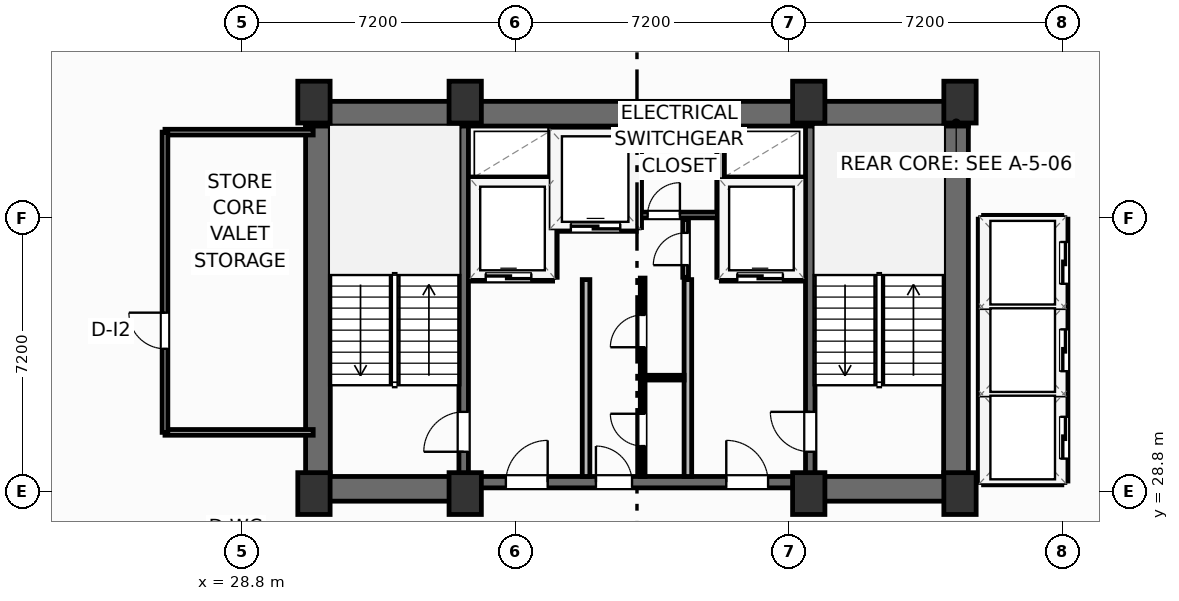
"""IFC4 building model, lengths in metres.
Left out: names, types, materials, properties, quantities, classifications, styles, units other than length and angle.
Written with IfcOpenShell. Run it as: python <this file> out.ifc"""

import sys

from ifc_helpers import new_model, si_unit, direction, frame, frame_2d, origin, origin_2d, place, context, subcontext, project, spatial, rectangle, extrude, element, fill, save


model = new_model("IFC4")
c1 = context("Model", 3, precision=1e-05, world=origin(), true_north=direction((0.0, 1.0)))
c2 = subcontext(c1, "Body", "Model", "MODEL_VIEW")
j1 = project(units=[si_unit("LENGTHUNIT", "METRE"), si_unit("PLANEANGLEUNIT", "RADIAN")], contexts=[c1])
p1 = place(None, origin())
s1 = spatial("IfcSite", under=j1, at=p1, CompositionType="ELEMENT")
p2 = place(p1, origin())
s2 = spatial("IfcBuilding", under=s1, at=p2, CompositionType="ELEMENT")
p3 = place(p2, frame((0.0, 0.0, 182.0)))
s3 = spatial("IfcBuildingStorey", under=s2, at=p3, CompositionType="ELEMENT", Elevation=182.0)
for number, where, z_axis, x_axis in (
    (1, (30.7, 28.75, 0.0), (0.0, 0.0, 1.0), (1.0, 0.0, 0.0)),
    (2, (34.68, 28.75, 0.0), (0.0, 0.0, 1.0), (1.0, 0.0, 0.0)),
    (3, (43.72, 28.75, 0.0), (0.0, 0.0, 1.0), (1.0, 0.0, 0.0)),
    (4, (47.7, 28.75, 0.0), (0.0, 0.0, 1.0), (1.0, 0.0, 0.0)),
    (5, (30.7, 39.05, 0.0), (0.0, 0.0, 1.0), (1.0, 0.0, 0.0)),
    (6, (34.68, 39.05, 0.0), (0.0, 0.0, 1.0), (1.0, 0.0, 0.0)),
    (7, (43.72, 39.05, 0.0), (0.0, 0.0, 1.0), (1.0, 0.0, 0.0)),
    (8, (47.7, 39.05, 0.0), (0.0, 0.0, 1.0), (1.0, 0.0, 0.0)),
):
    element("IfcColumn", number, at=place(p3, frame(where, z_axis=z_axis, x_axis=x_axis)), inside=s3, PredefinedType="COLUMN", context=c2, shape_type="SweptSolid", body=[
        extrude(rectangle(XDim=0.85, YDim=1.1, at=origin_2d()), origin(), (0.0, 0.0, 1.0), 3.7),
    ])
p4 = place(p3, frame((30.48, 38.745, 0.0), z_axis=(0.0, 0.0, 1.0), x_axis=(1.0, 0.0, 0.0)))
e9 = element("IfcWall", 9, at=p4, inside=s3, PredefinedType="SHEAR", context=c2, shape_type="SweptSolid", body=[
    extrude(rectangle(XDim=17.44, YDim=0.65, at=frame_2d((8.72, 0.0))), origin(), (0.0, 0.0, 1.0), 3.45),
])
for number, where, z_axis, x_axis in (
    (10, (30.805, 29.2, 0.0), (0.0, 0.0, 1.0), (0.0, 1.0, 0.0)),
    (11, (47.595, 29.2, 0.0), (0.0, 0.0, 1.0), (0.0, 1.0, 0.0)),
):
    element("IfcWall", number, at=place(p3, frame(where, z_axis=z_axis, x_axis=x_axis)), inside=s3, PredefinedType="SHEAR", context=c2, shape_type="SweptSolid", body=[
        extrude(rectangle(XDim=9.22, YDim=0.65, at=frame_2d((4.61, 0.0))), origin(), (0.0, 0.0, 1.0), 3.45),
    ])
p5 = place(p3, frame((30.48, 28.875, 0.0), z_axis=(0.0, 0.0, 1.0), x_axis=(1.0, 0.0, 0.0)))
e12 = element("IfcWall", 12, at=p5, inside=s3, PredefinedType="SHEAR", context=c2, shape_type="SweptSolid", body=[
    extrude(rectangle(XDim=4.32, YDim=0.65, at=frame_2d((2.16, 0.0))), origin(), (0.0, 0.0, 1.0), 3.45),
])
p6 = place(p3, frame((43.6, 28.875, 0.0), z_axis=(0.0, 0.0, 1.0), x_axis=(1.0, 0.0, 0.0)))
e13 = element("IfcWall", 13, at=p6, inside=s3, PredefinedType="SHEAR", context=c2, shape_type="SweptSolid", body=[
    extrude(rectangle(XDim=4.32, YDim=0.65, at=frame_2d((2.16, 0.0))), origin(), (0.0, 0.0, 1.0), 3.45),
])
p7 = place(p3, frame((34.8, 29.05, 0.0), z_axis=(0.0, 0.0, 1.0), x_axis=(1.0, 0.0, 0.0)))
e14 = element("IfcWall", 14, at=p7, inside=s3, PredefinedType="SHEAR", context=c2, shape_type="SweptSolid", body=[
    extrude(rectangle(XDim=8.8, YDim=0.3, at=frame_2d((4.4, 0.0))), origin(), (0.0, 0.0, 1.0), 3.45),
])
p8 = place(p7, frame((0.95, 0.0, 0.0)))
e15 = element("IfcOpeningElement", 15, at=p8, cuts=e14, PredefinedType="OPENING", context=c2, shape_type="SweptSolid", body=[
    extrude(rectangle(XDim=1.1, YDim=2.15, at=frame_2d((0.55, 1.075))), frame((0.0, 0.16, 0.0), z_axis=(0.0, -1.0, 0.0), x_axis=(1.0, 0.0, 0.0)), (0.0, 0.0, 1.0), 0.32),
])
p9 = place(p7, frame((6.75, 0.0, 0.0)))
e16 = element("IfcOpeningElement", 16, at=p9, cuts=e14, PredefinedType="OPENING", context=c2, shape_type="SweptSolid", body=[
    extrude(rectangle(XDim=1.1, YDim=2.15, at=frame_2d((0.55, 1.075))), frame((0.0, 0.16, 0.0), z_axis=(0.0, -1.0, 0.0), x_axis=(1.0, 0.0, 0.0)), (0.0, 0.0, 1.0), 0.32),
])
p10 = place(p7, frame((3.32, 0.0, 0.0)))
e17 = element("IfcOpeningElement", 17, at=p10, cuts=e14, PredefinedType="OPENING", context=c2, shape_type="SweptSolid", body=[
    extrude(rectangle(XDim=0.95, YDim=2.15, at=frame_2d((0.475, 1.075))), frame((0.0, 0.16, 0.0), z_axis=(0.0, -1.0, 0.0), x_axis=(1.0, 0.0, 0.0)), (0.0, 0.0, 1.0), 0.32),
])
p11 = place(p3, frame((34.64, 29.2, 0.0), z_axis=(0.0, 0.0, 1.0), x_axis=(0.0, 1.0, 0.0)))
e18 = element("IfcWall", 18, at=p11, inside=s3, PredefinedType="SHEAR", context=c2, shape_type="SweptSolid", body=[
    extrude(rectangle(XDim=9.22, YDim=0.25, at=frame_2d((4.61, 0.0))), origin(), (0.0, 0.0, 1.0), 3.45),
])
p12 = place(p11, frame((0.65, 0.0, 0.0)))
e19 = element("IfcOpeningElement", 19, at=p12, cuts=e18, PredefinedType="OPENING", context=c2, shape_type="SweptSolid", body=[
    extrude(rectangle(XDim=1.05, YDim=2.15, at=frame_2d((0.525, 1.075))), frame((0.0, 0.135, 0.0), z_axis=(0.0, -1.0, 0.0), x_axis=(1.0, 0.0, 0.0)), (0.0, 0.0, 1.0), 0.27),
])
p13 = place(p3, frame((43.76, 29.2, 0.0), z_axis=(0.0, 0.0, 1.0), x_axis=(0.0, 1.0, 0.0)))
e20 = element("IfcWall", 20, at=p13, inside=s3, PredefinedType="SHEAR", context=c2, shape_type="SweptSolid", body=[
    extrude(rectangle(XDim=9.22, YDim=0.25, at=frame_2d((4.61, 0.0))), origin(), (0.0, 0.0, 1.0), 3.45),
])
p14 = place(p13, frame((0.65, 0.0, 0.0)))
e21 = element("IfcOpeningElement", 21, at=p14, cuts=e20, PredefinedType="OPENING", context=c2, shape_type="SweptSolid", body=[
    extrude(rectangle(XDim=1.05, YDim=2.15, at=frame_2d((0.525, 1.075))), frame((0.0, 0.135, 0.0), z_axis=(0.0, -1.0, 0.0), x_axis=(1.0, 0.0, 0.0)), (0.0, 0.0, 1.0), 0.27),
])
for number, where, z_axis, x_axis in (
    (22, (37.86, 29.2, 0.0), (0.0, 0.0, 1.0), (0.0, 1.0, 0.0)),
    (23, (40.54, 29.2, 0.0), (0.0, 0.0, 1.0), (0.0, 1.0, 0.0)),
):
    element("IfcWall", number, at=place(p3, frame(where, z_axis=z_axis, x_axis=x_axis)), inside=s3, PredefinedType="PARTITIONING", context=c2, shape_type="SweptSolid", body=[
        extrude(rectangle(XDim=5.18, YDim=0.2, at=frame_2d((2.59, 0.0))), origin(), (0.0, 0.0, 1.0), 3.45),
    ])
p15 = place(p3, frame((34.8, 34.44, 0.0), z_axis=(0.0, 0.0, 1.0), x_axis=(1.0, 0.0, 0.0)))
e24 = element("IfcWall", 24, at=p15, inside=s3, PredefinedType="PARTITIONING", context=c2, shape_type="SweptSolid", body=[
    extrude(rectangle(XDim=2.18, YDim=0.2, at=frame_2d((1.09, 0.0))), origin(), (0.0, 0.0, 1.0), 3.45),
])
p16 = place(p15, frame((0.42, 0.0, 0.0)))
e25 = element("IfcOpeningElement", 25, at=p16, cuts=e24, PredefinedType="OPENING", context=c2, shape_type="SweptSolid", body=[
    extrude(rectangle(XDim=1.2, YDim=2.2, at=frame_2d((0.6, 1.1))), frame((0.0, 0.11, 0.0), z_axis=(0.0, -1.0, 0.0), x_axis=(1.0, 0.0, 0.0)), (0.0, 0.0, 1.0), 0.22),
])
p17 = place(p3, frame((34.8, 36.98, 0.0), z_axis=(0.0, 0.0, 1.0), x_axis=(1.0, 0.0, 0.0)))
e26 = element("IfcWall", 26, at=p17, inside=s3, PredefinedType="PARTITIONING", context=c2, shape_type="SweptSolid", body=[
    extrude(rectangle(XDim=2.18, YDim=0.2, at=frame_2d((1.09, 0.0))), origin(), (0.0, 0.0, 1.0), 3.45),
])
p18 = place(p3, frame((37.0, 34.44, 0.0), z_axis=(0.0, 0.0, 1.0), x_axis=(0.0, 1.0, 0.0)))
e27 = element("IfcWall", 27, at=p18, inside=s3, PredefinedType="PARTITIONING", context=c2, shape_type="SweptSolid", body=[
    extrude(rectangle(XDim=3.9, YDim=0.2, at=frame_2d((1.95, 0.0))), origin(), (0.0, 0.0, 1.0), 3.45),
])
p19 = place(p3, frame((41.42, 34.44, 0.0), z_axis=(0.0, 0.0, 1.0), x_axis=(1.0, 0.0, 0.0)))
e28 = element("IfcWall", 28, at=p19, inside=s3, PredefinedType="PARTITIONING", context=c2, shape_type="SweptSolid", body=[
    extrude(rectangle(XDim=2.18, YDim=0.2, at=frame_2d((1.09, 0.0))), origin(), (0.0, 0.0, 1.0), 3.45),
])
p20 = place(p19, frame((0.42, 0.0, 0.0)))
e29 = element("IfcOpeningElement", 29, at=p20, cuts=e28, PredefinedType="OPENING", context=c2, shape_type="SweptSolid", body=[
    extrude(rectangle(XDim=1.2, YDim=2.2, at=frame_2d((0.6, 1.1))), frame((0.0, 0.11, 0.0), z_axis=(0.0, -1.0, 0.0), x_axis=(1.0, 0.0, 0.0)), (0.0, 0.0, 1.0), 0.22),
])
p21 = place(p3, frame((41.42, 36.98, 0.0), z_axis=(0.0, 0.0, 1.0), x_axis=(1.0, 0.0, 0.0)))
e30 = element("IfcWall", 30, at=p21, inside=s3, PredefinedType="PARTITIONING", context=c2, shape_type="SweptSolid", body=[
    extrude(rectangle(XDim=2.18, YDim=0.2, at=frame_2d((1.09, 0.0))), origin(), (0.0, 0.0, 1.0), 3.45),
])
p22 = place(p3, frame((41.4, 34.44, 0.0), z_axis=(0.0, 0.0, 1.0), x_axis=(0.0, 1.0, 0.0)))
e31 = element("IfcWall", 31, at=p22, inside=s3, PredefinedType="PARTITIONING", context=c2, shape_type="SweptSolid", body=[
    extrude(rectangle(XDim=3.9, YDim=0.2, at=frame_2d((1.95, 0.0))), origin(), (0.0, 0.0, 1.0), 3.45),
])
p23 = place(p3, frame((37.06, 35.75, 0.0), z_axis=(0.0, 0.0, 1.0), x_axis=(1.0, 0.0, 0.0)))
e32 = element("IfcWall", 32, at=p23, inside=s3, PredefinedType="PARTITIONING", context=c2, shape_type="SweptSolid", body=[
    extrude(rectangle(XDim=2.12, YDim=0.2, at=frame_2d((1.06, 0.0))), origin(), (0.0, 0.0, 1.0), 3.45),
])
p24 = place(p23, frame((0.4, 0.0, 0.0)))
e33 = element("IfcOpeningElement", 33, at=p24, cuts=e32, PredefinedType="OPENING", context=c2, shape_type="SweptSolid", body=[
    extrude(rectangle(XDim=1.3, YDim=2.2, at=frame_2d((0.65, 1.1))), frame((0.0, 0.11, 0.0), z_axis=(0.0, -1.0, 0.0), x_axis=(1.0, 0.0, 0.0)), (0.0, 0.0, 1.0), 0.22),
])
p25 = place(p3, frame((39.22, 35.75, 0.0), z_axis=(0.0, 0.0, 1.0), x_axis=(0.0, 1.0, 0.0)))
e34 = element("IfcWall", 34, at=p25, inside=s3, PredefinedType="PARTITIONING", context=c2, shape_type="SweptSolid", body=[
    extrude(rectangle(XDim=2.59, YDim=0.2, at=frame_2d((1.295, 0.0))), origin(), (0.0, 0.0, 1.0), 3.45),
])
p26 = place(p3, frame((39.3, 36.08, 0.0), z_axis=(0.0, 0.0, 1.0), x_axis=(1.0, 0.0, 0.0)))
e35 = element("IfcWall", 35, at=p26, inside=s3, PredefinedType="PARTITIONING", context=c2, shape_type="SweptSolid", body=[
    extrude(rectangle(XDim=2.02, YDim=0.15, at=frame_2d((1.01, 0.0))), origin(), (0.0, 0.0, 1.0), 3.45),
])
p27 = place(p26, frame((0.18, 0.0, 0.0)))
e36 = element("IfcOpeningElement", 36, at=p27, cuts=e35, PredefinedType="OPENING", context=c2, shape_type="SweptSolid", body=[
    extrude(rectangle(XDim=0.85, YDim=2.05, at=frame_2d((0.425, 1.025))), frame((0.0, 0.085, 0.0), z_axis=(0.0, -1.0, 0.0), x_axis=(1.0, 0.0, 0.0)), (0.0, 0.0, 1.0), 0.17),
])
p28 = place(p3, frame((40.48, 34.44, 0.0), z_axis=(0.0, 0.0, 1.0), x_axis=(0.0, 1.0, 0.0)))
e37 = element("IfcWall", 37, at=p28, inside=s3, PredefinedType="PARTITIONING", context=c2, shape_type="SweptSolid", body=[
    extrude(rectangle(XDim=1.52, YDim=0.15, at=frame_2d((0.76, 0.0))), origin(), (0.0, 0.0, 1.0), 3.45),
])
p29 = place(p28, frame((0.32, 0.0, 0.0)))
e38 = element("IfcOpeningElement", 38, at=p29, cuts=e37, PredefinedType="OPENING", context=c2, shape_type="SweptSolid", body=[
    extrude(rectangle(XDim=0.85, YDim=2.05, at=frame_2d((0.425, 1.025))), frame((0.0, 0.085, 0.0), z_axis=(0.0, -1.0, 0.0), x_axis=(1.0, 0.0, 0.0)), (0.0, 0.0, 1.0), 0.17),
])
p30 = place(p3, frame((39.35, 31.8, 0.0), z_axis=(0.0, 0.0, 1.0), x_axis=(1.0, 0.0, 0.0)))
e39 = element("IfcWall", 39, at=p30, inside=s3, PredefinedType="PARTITIONING", context=c2, shape_type="SweptSolid", body=[
    extrude(rectangle(XDim=1.09, YDim=0.125, at=frame_2d((0.545, 0.0))), origin(), (0.0, 0.0, 1.0), 3.45),
])
p31 = place(p3, frame((39.35, 29.2, 0.0), z_axis=(0.0, 0.0, 1.0), x_axis=(0.0, 1.0, 0.0)))
e40 = element("IfcWall", 40, at=p31, inside=s3, PredefinedType="PARTITIONING", context=c2, shape_type="SweptSolid", body=[
    extrude(rectangle(XDim=5.22, YDim=0.125, at=frame_2d((2.61, 0.0))), origin(), (0.0, 0.0, 1.0), 3.45),
])
p32 = place(p31, frame((0.8, 0.0, 0.0)))
e41 = element("IfcOpeningElement", 41, at=p32, cuts=e40, PredefinedType="OPENING", context=c2, shape_type="SweptSolid", body=[
    extrude(rectangle(XDim=0.85, YDim=2.05, at=frame_2d((0.425, 1.025))), frame((0.0, 0.073, 0.0), z_axis=(0.0, -1.0, 0.0), x_axis=(1.0, 0.0, 0.0)), (0.0, 0.0, 1.0), 0.145),
])
p33 = place(p31, frame((3.4, 0.0, 0.0)))
e42 = element("IfcOpeningElement", 42, at=p33, cuts=e40, PredefinedType="OPENING", context=c2, shape_type="SweptSolid", body=[
    extrude(rectangle(XDim=0.85, YDim=2.05, at=frame_2d((0.425, 1.025))), frame((0.0, 0.073, 0.0), z_axis=(0.0, -1.0, 0.0), x_axis=(1.0, 0.0, 0.0)), (0.0, 0.0, 1.0), 0.145),
])
for number, where, z_axis, x_axis in (
    (43, (26.78, 30.36, 0.0), (0.0, 0.0, 1.0), (1.0, 0.0, 0.0)),
    (44, (26.78, 38.26, 0.0), (0.0, 0.0, 1.0), (1.0, 0.0, 0.0)),
):
    element("IfcWall", number, at=place(p3, frame(where, z_axis=z_axis, x_axis=x_axis)), inside=s3, PredefinedType="PARTITIONING", context=c2, shape_type="SweptSolid", body=[
        extrude(rectangle(XDim=3.9, YDim=0.15, at=frame_2d((1.95, 0.0))), origin(), (0.0, 0.0, 1.0), 3.45),
    ])
p34 = place(p3, frame((26.78, 30.36, 0.0), z_axis=(0.0, 0.0, 1.0), x_axis=(0.0, 1.0, 0.0)))
e45 = element("IfcWall", 45, at=p34, inside=s3, PredefinedType="PARTITIONING", context=c2, shape_type="SweptSolid", body=[
    extrude(rectangle(XDim=7.9, YDim=0.15, at=frame_2d((3.95, 0.0))), origin(), (0.0, 0.0, 1.0), 3.45),
])
p35 = place(p34, frame((2.2, 0.0, 0.0)))
e46 = element("IfcOpeningElement", 46, at=p35, cuts=e45, PredefinedType="OPENING", context=c2, shape_type="SweptSolid", body=[
    extrude(rectangle(XDim=0.95, YDim=2.05, at=frame_2d((0.475, 1.025))), frame((0.0, 0.085, 0.0), z_axis=(0.0, -1.0, 0.0), x_axis=(1.0, 0.0, 0.0)), (0.0, 0.0, 1.0), 0.17),
])
for number, where, z_axis, x_axis in (
    (47, (48.32, 31.375, 0.0), (0.0, 0.0, 1.0), (1.0, 0.0, 0.0)),
    (48, (48.32, 33.675, 0.0), (0.0, 0.0, 1.0), (1.0, 0.0, 0.0)),
):
    element("IfcWall", number, at=place(p3, frame(where, z_axis=z_axis, x_axis=x_axis)), inside=s3, PredefinedType="PARTITIONING", context=c2, shape_type="SweptSolid", body=[
        extrude(rectangle(XDim=2.06, YDim=0.2, at=frame_2d((1.03, 0.0))), origin(), (0.0, 0.0, 1.0), 3.45),
    ])
p36 = place(p3, frame((48.32, 29.08, 0.0), z_axis=(0.0, 0.0, 1.0), x_axis=(1.0, 0.0, 0.0)))
e49 = element("IfcWall", 49, at=p36, inside=s3, PredefinedType="PARTITIONING", context=c2, shape_type="SweptSolid", body=[
    extrude(rectangle(XDim=2.06, YDim=0.2, at=frame_2d((1.03, 0.0))), origin(), (0.0, 0.0, 1.0), 2.662),
])
p37 = place(p3, frame((48.32, 35.97, 0.0), z_axis=(0.0, 0.0, 1.0), x_axis=(1.0, 0.0, 0.0)))
e50 = element("IfcWall", 50, at=p37, inside=s3, PredefinedType="PARTITIONING", context=c2, shape_type="SweptSolid", body=[
    extrude(rectangle(XDim=2.06, YDim=0.2, at=frame_2d((1.03, 0.0))), origin(), (0.0, 0.0, 1.0), 3.45),
])
p38 = place(p3, frame((48.28, 29.08, 0.0), z_axis=(0.0, 0.0, 1.0), x_axis=(0.0, 1.0, 0.0)))
e51 = element("IfcWall", 51, at=p38, inside=s3, PredefinedType="PARTITIONING", context=c2, shape_type="SweptSolid", body=[
    extrude(rectangle(XDim=6.89, YDim=0.2, at=frame_2d((3.445, 0.0))), origin(), (0.0, 0.0, 1.0), 3.45),
])
p39 = place(p3, frame((50.44, 29.08, 0.0), z_axis=(0.0, 0.0, 1.0), x_axis=(0.0, 1.0, 0.0)))
e52 = element("IfcWall", 52, at=p39, inside=s3, PredefinedType="PARTITIONING", context=c2, shape_type="SweptSolid", body=[
    extrude(rectangle(XDim=6.89, YDim=0.2, at=frame_2d((3.445, 0.0))), origin(), (0.0, 0.0, 1.0), 3.45),
])
p40 = place(p39, frame((0.59, 0.0, 0.0)))
e53 = element("IfcOpeningElement", 53, at=p40, cuts=e52, PredefinedType="OPENING", context=c2, shape_type="SweptSolid", body=[
    extrude(rectangle(XDim=1.1, YDim=2.15, at=frame_2d((0.55, 1.075))), frame((0.0, 0.11, 0.0), z_axis=(0.0, -1.0, 0.0), x_axis=(1.0, 0.0, 0.0)), (0.0, 0.0, 1.0), 0.22),
])
p41 = place(p39, frame((2.89, 0.0, 0.0)))
e54 = element("IfcOpeningElement", 54, at=p41, cuts=e52, PredefinedType="OPENING", context=c2, shape_type="SweptSolid", body=[
    extrude(rectangle(XDim=1.1, YDim=2.15, at=frame_2d((0.55, 1.075))), frame((0.0, 0.11, 0.0), z_axis=(0.0, -1.0, 0.0), x_axis=(1.0, 0.0, 0.0)), (0.0, 0.0, 1.0), 0.22),
])
p42 = place(p39, frame((5.19, 0.0, 0.0)))
e55 = element("IfcOpeningElement", 55, at=p42, cuts=e52, PredefinedType="OPENING", context=c2, shape_type="SweptSolid", body=[
    extrude(rectangle(XDim=1.1, YDim=2.15, at=frame_2d((0.55, 1.075))), frame((0.0, 0.11, 0.0), z_axis=(0.0, -1.0, 0.0), x_axis=(1.0, 0.0, 0.0)), (0.0, 0.0, 1.0), 0.22),
])
p43 = place(p12, origin())
e56 = element("IfcDoor", 56, at=p43, inside=s3, OperationType="SINGLE_SWING_LEFT", PredefinedType="DOOR", context=c2, shape_type="SweptSolid", body=[
    extrude(rectangle(XDim=1.05, YDim=2.15, at=frame_2d((0.525, 1.075))), frame((0.0, 0.025, 0.0), z_axis=(0.0, -1.0, 0.0), x_axis=(1.0, 0.0, 0.0)), (0.0, 0.0, 1.0), 0.05),
])
fill(e19, e56)
p44 = place(p14, origin())
e57 = element("IfcDoor", 57, at=p44, inside=s3, OperationType="SINGLE_SWING_RIGHT", PredefinedType="DOOR", context=c2, shape_type="SweptSolid", body=[
    extrude(rectangle(XDim=1.05, YDim=2.15, at=frame_2d((0.525, 1.075))), frame((0.0, 0.025, 0.0), z_axis=(0.0, -1.0, 0.0), x_axis=(1.0, 0.0, 0.0)), (0.0, 0.0, 1.0), 0.05),
])
fill(e21, e57)
p45 = place(p8, origin())
e58 = element("IfcDoor", 58, at=p45, inside=s3, OperationType="SINGLE_SWING_RIGHT", PredefinedType="DOOR", context=c2, shape_type="SweptSolid", body=[
    extrude(rectangle(XDim=1.1, YDim=2.15, at=frame_2d((0.55, 1.075))), frame((0.0, 0.025, 0.0), z_axis=(0.0, -1.0, 0.0), x_axis=(1.0, 0.0, 0.0)), (0.0, 0.0, 1.0), 0.05),
])
fill(e15, e58)
p46 = place(p9, origin())
e59 = element("IfcDoor", 59, at=p46, inside=s3, OperationType="SINGLE_SWING_LEFT", PredefinedType="DOOR", context=c2, shape_type="SweptSolid", body=[
    extrude(rectangle(XDim=1.1, YDim=2.15, at=frame_2d((0.55, 1.075))), frame((0.0, 0.025, 0.0), z_axis=(0.0, -1.0, 0.0), x_axis=(1.0, 0.0, 0.0)), (0.0, 0.0, 1.0), 0.05),
])
fill(e16, e59)
p47 = place(p16, origin())
e60 = element("IfcDoor", 60, at=p47, inside=s3, OperationType="SLIDING_TO_LEFT", PredefinedType="DOOR", context=c2, shape_type="SweptSolid", body=[
    extrude(rectangle(XDim=1.2, YDim=2.2, at=frame_2d((0.6, 1.1))), frame((0.0, 0.025, 0.0), z_axis=(0.0, -1.0, 0.0), x_axis=(1.0, 0.0, 0.0)), (0.0, 0.0, 1.0), 0.05),
])
fill(e25, e60)
p48 = place(p20, origin())
e61 = element("IfcDoor", 61, at=p48, inside=s3, OperationType="SLIDING_TO_LEFT", PredefinedType="DOOR", context=c2, shape_type="SweptSolid", body=[
    extrude(rectangle(XDim=1.2, YDim=2.2, at=frame_2d((0.6, 1.1))), frame((0.0, 0.025, 0.0), z_axis=(0.0, -1.0, 0.0), x_axis=(1.0, 0.0, 0.0)), (0.0, 0.0, 1.0), 0.05),
])
fill(e29, e61)
p49 = place(p24, origin())
e62 = element("IfcDoor", 62, at=p49, inside=s3, OperationType="SLIDING_TO_LEFT", PredefinedType="DOOR", context=c2, shape_type="SweptSolid", body=[
    extrude(rectangle(XDim=1.3, YDim=2.2, at=frame_2d((0.65, 1.1))), frame((0.0, 0.025, 0.0), z_axis=(0.0, -1.0, 0.0), x_axis=(1.0, 0.0, 0.0)), (0.0, 0.0, 1.0), 0.05),
])
fill(e33, e62)
p50 = place(p27, origin())
e63 = element("IfcDoor", 63, at=p50, inside=s3, OperationType="SINGLE_SWING_RIGHT", PredefinedType="DOOR", context=c2, shape_type="SweptSolid", body=[
    extrude(rectangle(XDim=0.85, YDim=2.05, at=frame_2d((0.425, 1.025))), frame((0.0, 0.025, 0.0), z_axis=(0.0, -1.0, 0.0), x_axis=(1.0, 0.0, 0.0)), (0.0, 0.0, 1.0), 0.05),
])
fill(e36, e63)
p51 = place(p29, origin())
e64 = element("IfcDoor", 64, at=p51, inside=s3, OperationType="SINGLE_SWING_LEFT", PredefinedType="DOOR", context=c2, shape_type="SweptSolid", body=[
    extrude(rectangle(XDim=0.85, YDim=2.05, at=frame_2d((0.425, 1.025))), frame((0.0, 0.025, 0.0), z_axis=(0.0, -1.0, 0.0), x_axis=(1.0, 0.0, 0.0)), (0.0, 0.0, 1.0), 0.05),
])
fill(e38, e64)
p52 = place(p32, origin())
e65 = element("IfcDoor", 65, at=p52, inside=s3, OperationType="SINGLE_SWING_RIGHT", PredefinedType="DOOR", context=c2, shape_type="SweptSolid", body=[
    extrude(rectangle(XDim=0.85, YDim=2.05, at=frame_2d((0.425, 1.025))), frame((0.0, 0.025, 0.0), z_axis=(0.0, -1.0, 0.0), x_axis=(1.0, 0.0, 0.0)), (0.0, 0.0, 1.0), 0.05),
])
fill(e41, e65)
p53 = place(p33, origin())
e66 = element("IfcDoor", 66, at=p53, inside=s3, OperationType="SINGLE_SWING_LEFT", PredefinedType="DOOR", context=c2, shape_type="SweptSolid", body=[
    extrude(rectangle(XDim=0.85, YDim=2.05, at=frame_2d((0.425, 1.025))), frame((0.0, 0.025, 0.0), z_axis=(0.0, -1.0, 0.0), x_axis=(1.0, 0.0, 0.0)), (0.0, 0.0, 1.0), 0.05),
])
fill(e42, e66)
p54 = place(p10, origin())
e67 = element("IfcDoor", 67, at=p54, inside=s3, OperationType="SINGLE_SWING_LEFT", PredefinedType="DOOR", context=c2, shape_type="SweptSolid", body=[
    extrude(rectangle(XDim=0.95, YDim=2.15, at=frame_2d((0.475, 1.075))), frame((0.0, 0.025, 0.0), z_axis=(0.0, -1.0, 0.0), x_axis=(1.0, 0.0, 0.0)), (0.0, 0.0, 1.0), 0.05),
])
fill(e17, e67)
p55 = place(p35, origin())
e68 = element("IfcDoor", 68, at=p55, inside=s3, OperationType="SINGLE_SWING_RIGHT", PredefinedType="DOOR", context=c2, shape_type="SweptSolid", body=[
    extrude(rectangle(XDim=0.95, YDim=2.05, at=frame_2d((0.475, 1.025))), frame((0.0, 0.025, 0.0), z_axis=(0.0, -1.0, 0.0), x_axis=(1.0, 0.0, 0.0)), (0.0, 0.0, 1.0), 0.05),
])
fill(e46, e68)
p56 = place(p40, origin())
e69 = element("IfcDoor", 69, at=p56, inside=s3, OperationType="SLIDING_TO_LEFT", PredefinedType="DOOR", context=c2, shape_type="SweptSolid", body=[
    extrude(rectangle(XDim=1.1, YDim=2.15, at=frame_2d((0.55, 1.075))), frame((0.0, 0.025, 0.0), z_axis=(0.0, -1.0, 0.0), x_axis=(1.0, 0.0, 0.0)), (0.0, 0.0, 1.0), 0.05),
])
fill(e53, e69)
p57 = place(p41, origin())
e70 = element("IfcDoor", 70, at=p57, inside=s3, OperationType="SLIDING_TO_LEFT", PredefinedType="DOOR", context=c2, shape_type="SweptSolid", body=[
    extrude(rectangle(XDim=1.1, YDim=2.15, at=frame_2d((0.55, 1.075))), frame((0.0, 0.025, 0.0), z_axis=(0.0, -1.0, 0.0), x_axis=(1.0, 0.0, 0.0)), (0.0, 0.0, 1.0), 0.05),
])
fill(e54, e70)
p58 = place(p42, origin())
e71 = element("IfcDoor", 71, at=p58, inside=s3, OperationType="SLIDING_TO_LEFT", PredefinedType="DOOR", context=c2, shape_type="SweptSolid", body=[
    extrude(rectangle(XDim=1.1, YDim=2.15, at=frame_2d((0.55, 1.075))), frame((0.0, 0.025, 0.0), z_axis=(0.0, -1.0, 0.0), x_axis=(1.0, 0.0, 0.0)), (0.0, 0.0, 1.0), 0.05),
])
fill(e55, e71)
save(model, sys.argv[1])
